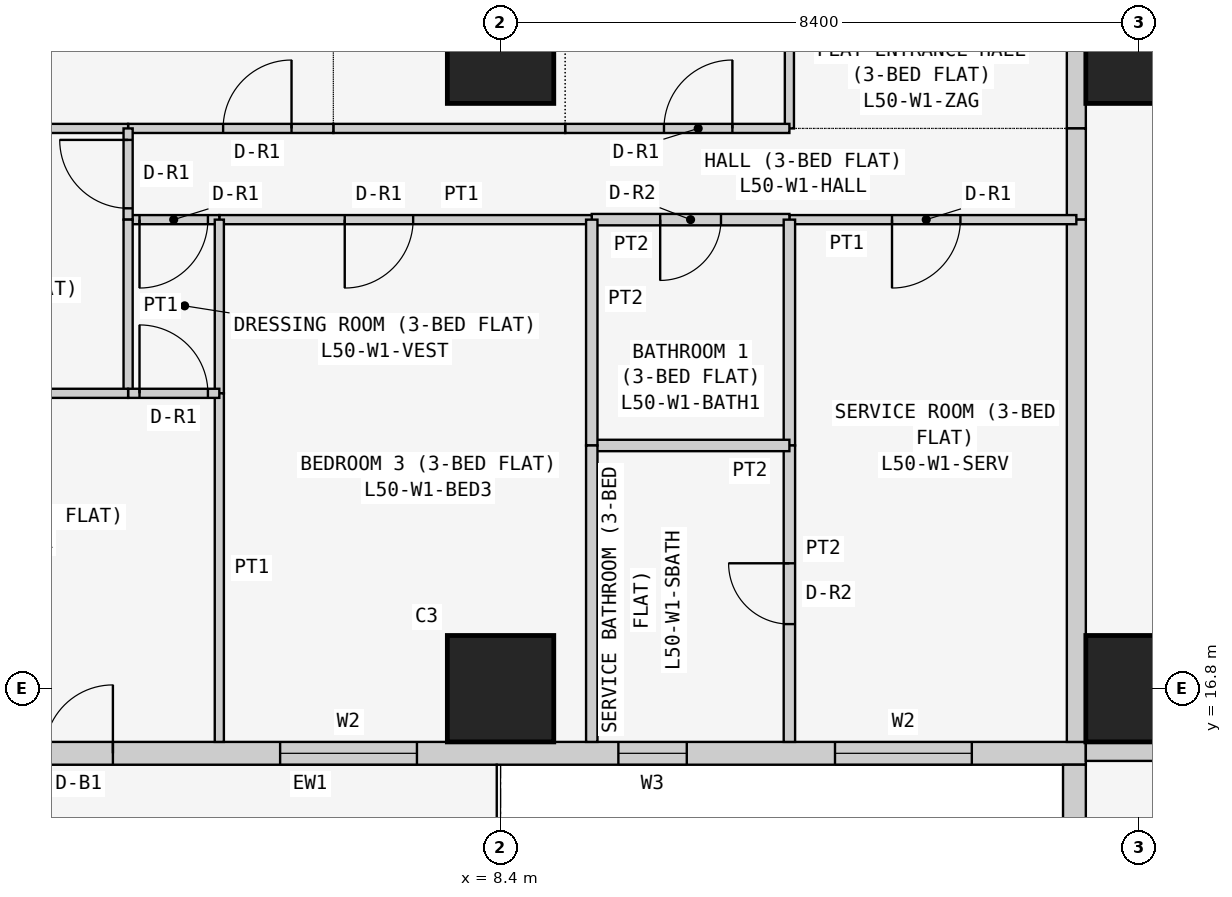
"""IFC4 building model, lengths in metres.
Left out: names, types, materials, properties, quantities, classifications, styles, units other than length and angle.
Written with IfcOpenShell. Run it as: python <this file> out.ifc"""

import sys

from ifc_helpers import new_model, si_unit, direction, frame, frame_2d, origin, origin_2d, place, context, subcontext, project, spatial, rectangle, extrude, element, fill, save


model = new_model("IFC4")
c1 = context("Model", 3, precision=1e-05, world=origin(), true_north=direction((0.0, 1.0)))
c2 = subcontext(c1, "Body", "Model", "MODEL_VIEW")
j1 = project(units=[si_unit("LENGTHUNIT", "METRE"), si_unit("PLANEANGLEUNIT", "RADIAN")], contexts=[c1])
p1 = place(None, origin())
s1 = spatial("IfcSite", under=j1, at=p1, CompositionType="ELEMENT")
p2 = place(p1, origin())
s2 = spatial("IfcBuilding", under=s1, at=p2, CompositionType="ELEMENT")
p3 = place(p2, frame((0.0, 0.0, 194.1)))
s3 = spatial("IfcBuildingStorey", under=s2, at=p3, CompositionType="ELEMENT", Elevation=194.1)
for number, where, z_axis, x_axis in (
    (1, (8.4, 16.8, 0.0), (0.0, 0.0, 1.0), (1.0, 0.0, 0.0)),
    (2, (8.4, 25.2, 0.0), (0.0, 0.0, 1.0), (1.0, 0.0, 0.0)),
    (3, (16.8, 16.8, 0.0), (0.0, 0.0, 1.0), (1.0, 0.0, 0.0)),
    (4, (16.8, 25.2, 0.0), (0.0, 0.0, 1.0), (1.0, 0.0, 0.0)),
):
    element("IfcColumn", number, at=place(p3, frame(where, z_axis=z_axis, x_axis=x_axis)), inside=s3, PredefinedType="COLUMN", context=c2, shape_type="SweptSolid", body=[
        extrude(rectangle(XDim=1.4, YDim=1.4, at=origin_2d()), origin(), (0.0, 0.0, 1.0), 3.6),
    ])
p4 = place(p3, frame((0.4, 15.95, 0.0), z_axis=(0.0, 0.0, 1.0), x_axis=(1.0, 0.0, 0.0)))
e5 = element("IfcWall", 5, at=p4, inside=s3, PredefinedType="SOLIDWALL", context=c2, shape_type="SweptSolid", body=[
    extrude(rectangle(XDim=15.7, YDim=0.3, at=frame_2d((7.85, 0.0))), origin(), (0.0, 0.0, 1.0), 3.45),
])
p5 = place(p4, frame((12.4, 0.0, 0.9)))
e6 = element("IfcOpeningElement", 6, at=p5, cuts=e5, PredefinedType="OPENING", context=c2, shape_type="SweptSolid", body=[
    extrude(rectangle(XDim=1.8, YDim=1.5, at=frame_2d((0.9, 0.75))), frame((0.0, 0.16, 0.0), z_axis=(0.0, -1.0, 0.0), x_axis=(1.0, 0.0, 0.0)), (0.0, 0.0, 1.0), 0.32),
])
p6 = place(p4, frame((9.55, 0.0, 1.5)))
e7 = element("IfcOpeningElement", 7, at=p6, cuts=e5, PredefinedType="OPENING", context=c2, shape_type="SweptSolid", body=[
    extrude(rectangle(XDim=0.9, YDim=0.7, at=frame_2d((0.45, 0.35))), frame((0.0, 0.16, 0.0), z_axis=(0.0, -1.0, 0.0), x_axis=(1.0, 0.0, 0.0)), (0.0, 0.0, 1.0), 0.32),
])
p7 = place(p4, frame((5.1, 0.0, 0.9)))
e8 = element("IfcOpeningElement", 8, at=p7, cuts=e5, PredefinedType="OPENING", context=c2, shape_type="SweptSolid", body=[
    extrude(rectangle(XDim=1.8, YDim=1.5, at=frame_2d((0.9, 0.75))), frame((0.0, 0.16, 0.0), z_axis=(0.0, -1.0, 0.0), x_axis=(1.0, 0.0, 0.0)), (0.0, 0.0, 1.0), 0.32),
])
p8 = place(p4, frame((2.0, 0.0, 0.0)))
e9 = element("IfcOpeningElement", 9, at=p8, cuts=e5, PredefinedType="OPENING", context=c2, shape_type="SweptSolid", body=[
    extrude(rectangle(XDim=0.9, YDim=2.4, at=frame_2d((0.45, 1.2))), frame((0.0, 0.16, 0.0), z_axis=(0.0, -1.0, 0.0), x_axis=(1.0, 0.0, 0.0)), (0.0, 0.0, 1.0), 0.32),
])
p9 = place(p4, frame((0.7, 0.0, 0.9)))
e10 = element("IfcOpeningElement", 10, at=p9, cuts=e5, PredefinedType="OPENING", context=c2, shape_type="SweptSolid", body=[
    extrude(rectangle(XDim=1.2, YDim=1.5, at=frame_2d((0.6, 0.75))), frame((0.0, 0.16, 0.0), z_axis=(0.0, -1.0, 0.0), x_axis=(1.0, 0.0, 0.0)), (0.0, 0.0, 1.0), 0.32),
])
p10 = place(p3, frame((15.95, 15.8, 0.0), z_axis=(0.0, 0.0, 1.0), x_axis=(0.0, -1.0, 0.0)))
e11 = element("IfcWall", 11, at=p10, inside=s3, PredefinedType="SOLIDWALL", context=c2, shape_type="SweptSolid", body=[
    extrude(rectangle(XDim=7.0, YDim=0.3, at=frame_2d((3.5, 0.0))), origin(), (0.0, 0.0, 1.0), 3.45),
])
p11 = place(p10, frame((1.5, 0.0, 0.9)))
e12 = element("IfcOpeningElement", 12, at=p11, cuts=e11, PredefinedType="OPENING", context=c2, shape_type="SweptSolid", body=[
    extrude(rectangle(XDim=2.4, YDim=1.5, at=frame_2d((1.2, 0.75))), frame((0.0, 0.16, 0.0), z_axis=(0.0, -1.0, 0.0), x_axis=(1.0, 0.0, 0.0)), (0.0, 0.0, 1.0), 0.32),
])
p12 = place(p10, frame((5.05, 0.0, 0.9)))
e13 = element("IfcOpeningElement", 13, at=p12, cuts=e11, PredefinedType="OPENING", context=c2, shape_type="SweptSolid", body=[
    extrude(rectangle(XDim=1.2, YDim=1.5, at=frame_2d((0.6, 0.75))), frame((0.0, 0.16, 0.0), z_axis=(0.0, -1.0, 0.0), x_axis=(1.0, 0.0, 0.0)), (0.0, 0.0, 1.0), 0.32),
])
p13 = place(p3, frame((22.971, 15.975, 0.0), z_axis=(0.0, 0.0, 1.0), x_axis=(-1.0, 0.0, 0.0)))
e14 = element("IfcWall", 14, at=p13, inside=s3, PredefinedType="PARTITIONING", context=c2, shape_type="SweptSolid", body=[
    extrude(rectangle(XDim=6.871, YDim=0.25, at=frame_2d((3.436, 0.0))), origin(), (0.0, 0.0, 1.0), 3.45),
])
p14 = place(p3, frame((15.975, 24.171, 0.0), z_axis=(0.0, 0.0, 1.0), x_axis=(0.0, 1.0, 0.0)))
e15 = element("IfcWall", 15, at=p14, inside=s3, PredefinedType="PARTITIONING", context=c2, shape_type="SweptSolid", body=[
    extrude(rectangle(XDim=5.229, YDim=0.25, at=frame_2d((2.615, 0.0))), origin(), (0.0, 0.0, 1.0), 3.45),
])
p15 = place(p14, frame((2.129, 0.0, 0.0)))
e16 = element("IfcOpeningElement", 16, at=p15, cuts=e15, PredefinedType="OPENING", context=c2, shape_type="SweptSolid", body=[
    extrude(rectangle(XDim=1.0, YDim=2.1, at=frame_2d((0.5, 1.05))), frame((0.0, 0.135, 0.0), z_axis=(0.0, -1.0, 0.0), x_axis=(1.0, 0.0, 0.0)), (0.0, 0.0, 1.0), 0.27),
])
p16 = place(p3, frame((15.975, 22.971, 0.0), z_axis=(0.0, 0.0, 1.0), x_axis=(0.0, 1.0, 0.0)))
e17 = element("IfcWall", 17, at=p16, inside=s3, PredefinedType="PARTITIONING", context=c2, shape_type="SweptSolid", body=[
    extrude(rectangle(XDim=1.2, YDim=0.25, at=frame_2d((0.6, 0.0))), origin(), (0.0, 0.0, 1.0), 3.45),
])
p17 = place(p3, frame((15.975, 16.1, 0.0), z_axis=(0.0, 0.0, 1.0), x_axis=(0.0, 1.0, 0.0)))
e18 = element("IfcWall", 18, at=p17, inside=s3, PredefinedType="PARTITIONING", context=c2, shape_type="SweptSolid", body=[
    extrude(rectangle(XDim=6.871, YDim=0.25, at=frame_2d((3.436, 0.0))), origin(), (0.0, 0.0, 1.0), 3.45),
])
p18 = place(p3, frame((12.2, 29.4, 0.0), z_axis=(0.0, 0.0, 1.0), x_axis=(0.0, -1.0, 0.0)))
e19 = element("IfcWall", 19, at=p18, inside=s3, PredefinedType="PARTITIONING", context=c2, shape_type="SweptSolid", body=[
    extrude(rectangle(XDim=5.229, YDim=0.12, at=frame_2d((2.615, 0.0))), origin(), (0.0, 0.0, 1.0), 3.45),
])
p19 = place(p3, frame((9.25, 24.171, 0.0), z_axis=(0.0, 0.0, 1.0), x_axis=(1.0, 0.0, 0.0)))
e20 = element("IfcWall", 20, at=p19, inside=s3, PredefinedType="PARTITIONING", context=c2, shape_type="SweptSolid", body=[
    extrude(rectangle(XDim=2.95, YDim=0.12, at=frame_2d((1.475, 0.0))), origin(), (0.0, 0.0, 1.0), 3.45),
])
p20 = place(p19, frame((1.3, 0.0, 0.0)))
e21 = element("IfcOpeningElement", 21, at=p20, cuts=e20, PredefinedType="OPENING", context=c2, shape_type="SweptSolid", body=[
    extrude(rectangle(XDim=0.9, YDim=2.1, at=frame_2d((0.45, 1.05))), frame((0.0, 0.07, 0.0), z_axis=(0.0, -1.0, 0.0), x_axis=(1.0, 0.0, 0.0)), (0.0, 0.0, 1.0), 0.14),
])
p21 = place(p3, frame((6.2, 24.171, 0.0), z_axis=(0.0, 0.0, 1.0), x_axis=(1.0, 0.0, 0.0)))
e22 = element("IfcWall", 22, at=p21, inside=s3, PredefinedType="PARTITIONING", context=c2, shape_type="SweptSolid", body=[
    extrude(rectangle(XDim=3.05, YDim=0.12, at=frame_2d((1.525, 0.0))), origin(), (0.0, 0.0, 1.0), 3.45),
])
p22 = place(p3, frame((3.5, 24.171, 0.0), z_axis=(0.0, 0.0, 1.0), x_axis=(1.0, 0.0, 0.0)))
e23 = element("IfcWall", 23, at=p22, inside=s3, PredefinedType="PARTITIONING", context=c2, shape_type="SweptSolid", body=[
    extrude(rectangle(XDim=2.7, YDim=0.12, at=frame_2d((1.35, 0.0))), origin(), (0.0, 0.0, 1.0), 3.45),
])
p23 = place(p22, frame((1.25, 0.0, 0.0)))
e24 = element("IfcOpeningElement", 24, at=p23, cuts=e23, PredefinedType="OPENING", context=c2, shape_type="SweptSolid", body=[
    extrude(rectangle(XDim=0.9, YDim=2.1, at=frame_2d((0.45, 1.05))), frame((0.0, 0.07, 0.0), z_axis=(0.0, -1.0, 0.0), x_axis=(1.0, 0.0, 0.0)), (0.0, 0.0, 1.0), 0.14),
])
p24 = place(p3, frame((-0.65, 24.171, 0.0), z_axis=(0.0, 0.0, 1.0), x_axis=(1.0, 0.0, 0.0)))
e25 = element("IfcWall", 25, at=p24, inside=s3, PredefinedType="PARTITIONING", context=c2, shape_type="SweptSolid", body=[
    extrude(rectangle(XDim=4.15, YDim=0.12, at=frame_2d((2.075, 0.0))), origin(), (0.0, 0.0, 1.0), 3.45),
])
p25 = place(p3, frame((12.2, 22.971, 0.0), z_axis=(0.0, 0.0, 1.0), x_axis=(1.0, 0.0, 0.0)))
e26 = element("IfcWall", 26, at=p25, inside=s3, PredefinedType="PARTITIONING", context=c2, shape_type="SweptSolid", body=[
    extrude(rectangle(XDim=3.775, YDim=0.12, at=frame_2d((1.888, 0.0))), origin(), (0.0, 0.0, 1.0), 3.45),
])
p26 = place(p25, frame((1.35, 0.0, 0.0)))
e27 = element("IfcOpeningElement", 27, at=p26, cuts=e26, PredefinedType="OPENING", context=c2, shape_type="SweptSolid", body=[
    extrude(rectangle(XDim=0.9, YDim=2.1, at=frame_2d((0.45, 1.05))), frame((0.0, 0.07, 0.0), z_axis=(0.0, -1.0, 0.0), x_axis=(1.0, 0.0, 0.0)), (0.0, 0.0, 1.0), 0.14),
])
p27 = place(p3, frame((9.6, 22.971, 0.0), z_axis=(0.0, 0.0, 1.0), x_axis=(1.0, 0.0, 0.0)))
e28 = element("IfcWall", 28, at=p27, inside=s3, PredefinedType="PARTITIONING", context=c2, shape_type="SweptSolid", body=[
    extrude(rectangle(XDim=2.6, YDim=0.15, at=frame_2d((1.3, 0.0))), origin(), (0.0, 0.0, 1.0), 3.45),
])
p28 = place(p27, frame((0.9, 0.0, 0.0)))
e29 = element("IfcOpeningElement", 29, at=p28, cuts=e28, PredefinedType="OPENING", context=c2, shape_type="SweptSolid", body=[
    extrude(rectangle(XDim=0.8, YDim=2.1, at=frame_2d((0.4, 1.05))), frame((0.0, 0.085, 0.0), z_axis=(0.0, -1.0, 0.0), x_axis=(1.0, 0.0, 0.0)), (0.0, 0.0, 1.0), 0.17),
])
p29 = place(p3, frame((4.7, 22.971, 0.0), z_axis=(0.0, 0.0, 1.0), x_axis=(1.0, 0.0, 0.0)))
e30 = element("IfcWall", 30, at=p29, inside=s3, PredefinedType="PARTITIONING", context=c2, shape_type="SweptSolid", body=[
    extrude(rectangle(XDim=4.9, YDim=0.12, at=frame_2d((2.45, 0.0))), origin(), (0.0, 0.0, 1.0), 3.45),
])
p30 = place(p29, frame((1.65, 0.0, 0.0)))
e31 = element("IfcOpeningElement", 31, at=p30, cuts=e30, PredefinedType="OPENING", context=c2, shape_type="SweptSolid", body=[
    extrude(rectangle(XDim=0.9, YDim=2.1, at=frame_2d((0.45, 1.05))), frame((0.0, 0.07, 0.0), z_axis=(0.0, -1.0, 0.0), x_axis=(1.0, 0.0, 0.0)), (0.0, 0.0, 1.0), 0.14),
])
p31 = place(p3, frame((3.5, 22.971, 0.0), z_axis=(0.0, 0.0, 1.0), x_axis=(1.0, 0.0, 0.0)))
e32 = element("IfcWall", 32, at=p31, inside=s3, PredefinedType="PARTITIONING", context=c2, shape_type="SweptSolid", body=[
    extrude(rectangle(XDim=1.2, YDim=0.12, at=frame_2d((0.6, 0.0))), origin(), (0.0, 0.0, 1.0), 3.45),
])
p32 = place(p31, frame((0.15, 0.0, 0.0)))
e33 = element("IfcOpeningElement", 33, at=p32, cuts=e32, PredefinedType="OPENING", context=c2, shape_type="SweptSolid", body=[
    extrude(rectangle(XDim=0.9, YDim=2.1, at=frame_2d((0.45, 1.05))), frame((0.0, 0.07, 0.0), z_axis=(0.0, -1.0, 0.0), x_axis=(1.0, 0.0, 0.0)), (0.0, 0.0, 1.0), 0.14),
])
p33 = place(p3, frame((3.5, 24.171, 0.0), z_axis=(0.0, 0.0, 1.0), x_axis=(0.0, -1.0, 0.0)))
e34 = element("IfcWall", 34, at=p33, inside=s3, PredefinedType="PARTITIONING", context=c2, shape_type="SweptSolid", body=[
    extrude(rectangle(XDim=1.2, YDim=0.12, at=frame_2d((0.6, 0.0))), origin(), (0.0, 0.0, 1.0), 3.45),
])
p34 = place(p33, frame((0.151, 0.0, 0.0)))
e35 = element("IfcOpeningElement", 35, at=p34, cuts=e34, PredefinedType="OPENING", context=c2, shape_type="SweptSolid", body=[
    extrude(rectangle(XDim=0.9, YDim=2.1, at=frame_2d((0.45, 1.05))), frame((0.0, 0.07, 0.0), z_axis=(0.0, -1.0, 0.0), x_axis=(1.0, 0.0, 0.0)), (0.0, 0.0, 1.0), 0.14),
])
p35 = place(p3, frame((12.2, 22.971, 0.0), z_axis=(0.0, 0.0, 1.0), x_axis=(0.0, -1.0, 0.0)))
e36 = element("IfcWall", 36, at=p35, inside=s3, PredefinedType="PARTITIONING", context=c2, shape_type="SweptSolid", body=[
    extrude(rectangle(XDim=2.971, YDim=0.15, at=frame_2d((1.485, 0.0))), origin(), (0.0, 0.0, 1.0), 3.45),
])
p36 = place(p3, frame((12.2, 20.0, 0.0), z_axis=(0.0, 0.0, 1.0), x_axis=(0.0, -1.0, 0.0)))
e37 = element("IfcWall", 37, at=p36, inside=s3, PredefinedType="PARTITIONING", context=c2, shape_type="SweptSolid", body=[
    extrude(rectangle(XDim=3.9, YDim=0.15, at=frame_2d((1.95, 0.0))), origin(), (0.0, 0.0, 1.0), 3.45),
])
p37 = place(p36, frame((1.55, 0.0, 0.0)))
e38 = element("IfcOpeningElement", 38, at=p37, cuts=e37, PredefinedType="OPENING", context=c2, shape_type="SweptSolid", body=[
    extrude(rectangle(XDim=0.8, YDim=2.1, at=frame_2d((0.4, 1.05))), frame((0.0, 0.085, 0.0), z_axis=(0.0, -1.0, 0.0), x_axis=(1.0, 0.0, 0.0)), (0.0, 0.0, 1.0), 0.17),
])
p38 = place(p3, frame((9.6, 20.0, 0.0), z_axis=(0.0, 0.0, 1.0), x_axis=(1.0, 0.0, 0.0)))
e39 = element("IfcWall", 39, at=p38, inside=s3, PredefinedType="PARTITIONING", context=c2, shape_type="SweptSolid", body=[
    extrude(rectangle(XDim=2.6, YDim=0.15, at=frame_2d((1.3, 0.0))), origin(), (0.0, 0.0, 1.0), 3.45),
])
p39 = place(p3, frame((9.6, 22.971, 0.0), z_axis=(0.0, 0.0, 1.0), x_axis=(0.0, -1.0, 0.0)))
e40 = element("IfcWall", 40, at=p39, inside=s3, PredefinedType="PARTITIONING", context=c2, shape_type="SweptSolid", body=[
    extrude(rectangle(XDim=2.971, YDim=0.15, at=frame_2d((1.485, 0.0))), origin(), (0.0, 0.0, 1.0), 3.45),
])
p40 = place(p3, frame((9.6, 20.0, 0.0), z_axis=(0.0, 0.0, 1.0), x_axis=(0.0, -1.0, 0.0)))
e41 = element("IfcWall", 41, at=p40, inside=s3, PredefinedType="PARTITIONING", context=c2, shape_type="SweptSolid", body=[
    extrude(rectangle(XDim=3.9, YDim=0.15, at=frame_2d((1.95, 0.0))), origin(), (0.0, 0.0, 1.0), 3.45),
])
p41 = place(p3, frame((4.7, 22.971, 0.0), z_axis=(0.0, 0.0, 1.0), x_axis=(0.0, -1.0, 0.0)))
e42 = element("IfcWall", 42, at=p41, inside=s3, PredefinedType="PARTITIONING", context=c2, shape_type="SweptSolid", body=[
    extrude(rectangle(XDim=2.285, YDim=0.12, at=frame_2d((1.143, 0.0))), origin(), (0.0, 0.0, 1.0), 3.45),
])
p42 = place(p3, frame((4.7, 20.686, 0.0), z_axis=(0.0, 0.0, 1.0), x_axis=(0.0, -1.0, 0.0)))
e43 = element("IfcWall", 43, at=p42, inside=s3, PredefinedType="PARTITIONING", context=c2, shape_type="SweptSolid", body=[
    extrude(rectangle(XDim=4.586, YDim=0.12, at=frame_2d((2.293, 0.0))), origin(), (0.0, 0.0, 1.0), 3.45),
])
p43 = place(p3, frame((3.5, 22.971, 0.0), z_axis=(0.0, 0.0, 1.0), x_axis=(0.0, -1.0, 0.0)))
e44 = element("IfcWall", 44, at=p43, inside=s3, PredefinedType="PARTITIONING", context=c2, shape_type="SweptSolid", body=[
    extrude(rectangle(XDim=2.285, YDim=0.12, at=frame_2d((1.143, 0.0))), origin(), (0.0, 0.0, 1.0), 3.45),
])
p44 = place(p3, frame((3.5, 20.686, 0.0), z_axis=(0.0, 0.0, 1.0), x_axis=(1.0, 0.0, 0.0)))
e45 = element("IfcWall", 45, at=p44, inside=s3, PredefinedType="PARTITIONING", context=c2, shape_type="SweptSolid", body=[
    extrude(rectangle(XDim=1.2, YDim=0.12, at=frame_2d((0.6, 0.0))), origin(), (0.0, 0.0, 1.0), 3.45),
])
p45 = place(p44, frame((0.15, 0.0, 0.0)))
e46 = element("IfcOpeningElement", 46, at=p45, cuts=e45, PredefinedType="OPENING", context=c2, shape_type="SweptSolid", body=[
    extrude(rectangle(XDim=0.9, YDim=2.1, at=frame_2d((0.45, 1.05))), frame((0.0, 0.07, 0.0), z_axis=(0.0, -1.0, 0.0), x_axis=(1.0, 0.0, 0.0)), (0.0, 0.0, 1.0), 0.14),
])
p46 = place(p3, frame((-0.65, 20.686, 0.0), z_axis=(0.0, 0.0, 1.0), x_axis=(1.0, 0.0, 0.0)))
e47 = element("IfcWall", 47, at=p46, inside=s3, PredefinedType="PARTITIONING", context=c2, shape_type="SweptSolid", body=[
    extrude(rectangle(XDim=4.15, YDim=0.12, at=frame_2d((2.075, 0.0))), origin(), (0.0, 0.0, 1.0), 3.45),
])
p47 = place(p5, origin())
e48 = element("IfcWindow", 48, at=p47, inside=s3, PartitioningType="SINGLE_PANEL", PredefinedType="WINDOW", context=c2, shape_type="SweptSolid", body=[
    extrude(rectangle(XDim=1.8, YDim=1.5, at=frame_2d((0.9, 0.75))), frame((0.0, 0.03, 0.0), z_axis=(0.0, -1.0, 0.0), x_axis=(1.0, 0.0, 0.0)), (0.0, 0.0, 1.0), 0.06),
])
fill(e6, e48)
p48 = place(p6, origin())
e49 = element("IfcWindow", 49, at=p48, inside=s3, PartitioningType="SINGLE_PANEL", PredefinedType="WINDOW", context=c2, shape_type="SweptSolid", body=[
    extrude(rectangle(XDim=0.9, YDim=0.7, at=frame_2d((0.45, 0.35))), frame((0.0, 0.03, 0.0), z_axis=(0.0, -1.0, 0.0), x_axis=(1.0, 0.0, 0.0)), (0.0, 0.0, 1.0), 0.06),
])
fill(e7, e49)
p49 = place(p7, origin())
e50 = element("IfcWindow", 50, at=p49, inside=s3, PartitioningType="SINGLE_PANEL", PredefinedType="WINDOW", context=c2, shape_type="SweptSolid", body=[
    extrude(rectangle(XDim=1.8, YDim=1.5, at=frame_2d((0.9, 0.75))), frame((0.0, 0.03, 0.0), z_axis=(0.0, -1.0, 0.0), x_axis=(1.0, 0.0, 0.0)), (0.0, 0.0, 1.0), 0.06),
])
fill(e8, e50)
p50 = place(p8, origin())
e51 = element("IfcDoor", 51, at=p50, inside=s3, OperationType="SINGLE_SWING_RIGHT", PredefinedType="DOOR", context=c2, shape_type="SweptSolid", body=[
    extrude(rectangle(XDim=0.9, YDim=2.4, at=frame_2d((0.45, 1.2))), frame((0.0, 0.025, 0.0), z_axis=(0.0, -1.0, 0.0), x_axis=(1.0, 0.0, 0.0)), (0.0, 0.0, 1.0), 0.05),
])
fill(e9, e51)
p51 = place(p20, origin())
e52 = element("IfcDoor", 52, at=p51, inside=s3, OperationType="SINGLE_SWING_RIGHT", PredefinedType="DOOR", context=c2, shape_type="SweptSolid", body=[
    extrude(rectangle(XDim=0.9, YDim=2.1, at=frame_2d((0.45, 1.05))), frame((0.0, 0.025, 0.0), z_axis=(0.0, -1.0, 0.0), x_axis=(1.0, 0.0, 0.0)), (0.0, 0.0, 1.0), 0.05),
])
fill(e21, e52)
p52 = place(p23, origin())
e53 = element("IfcDoor", 53, at=p52, inside=s3, OperationType="SINGLE_SWING_RIGHT", PredefinedType="DOOR", context=c2, shape_type="SweptSolid", body=[
    extrude(rectangle(XDim=0.9, YDim=2.1, at=frame_2d((0.45, 1.05))), frame((0.0, 0.025, 0.0), z_axis=(0.0, -1.0, 0.0), x_axis=(1.0, 0.0, 0.0)), (0.0, 0.0, 1.0), 0.05),
])
fill(e24, e53)
p53 = place(p26, frame((0.9, 0.0, 0.0), z_axis=(0.0, 0.0, 1.0), x_axis=(-1.0, 0.0, 0.0)))
e54 = element("IfcDoor", 54, at=p53, inside=s3, OperationType="SINGLE_SWING_RIGHT", PredefinedType="DOOR", context=c2, shape_type="SweptSolid", body=[
    extrude(rectangle(XDim=0.9, YDim=2.1, at=frame_2d((0.45, 1.05))), frame((0.0, 0.025, 0.0), z_axis=(0.0, -1.0, 0.0), x_axis=(1.0, 0.0, 0.0)), (0.0, 0.0, 1.0), 0.05),
])
fill(e27, e54)
p54 = place(p37, frame((0.8, 0.0, 0.0), z_axis=(0.0, 0.0, 1.0), x_axis=(-1.0, 0.0, 0.0)))
e55 = element("IfcDoor", 55, at=p54, inside=s3, OperationType="SINGLE_SWING_RIGHT", PredefinedType="DOOR", context=c2, shape_type="SweptSolid", body=[
    extrude(rectangle(XDim=0.8, YDim=2.1, at=frame_2d((0.4, 1.05))), frame((0.0, 0.025, 0.0), z_axis=(0.0, -1.0, 0.0), x_axis=(1.0, 0.0, 0.0)), (0.0, 0.0, 1.0), 0.05),
])
fill(e38, e55)
p55 = place(p28, frame((0.8, 0.0, 0.0), z_axis=(0.0, 0.0, 1.0), x_axis=(-1.0, 0.0, 0.0)))
e56 = element("IfcDoor", 56, at=p55, inside=s3, OperationType="SINGLE_SWING_RIGHT", PredefinedType="DOOR", context=c2, shape_type="SweptSolid", body=[
    extrude(rectangle(XDim=0.8, YDim=2.1, at=frame_2d((0.4, 1.05))), frame((0.0, 0.025, 0.0), z_axis=(0.0, -1.0, 0.0), x_axis=(1.0, 0.0, 0.0)), (0.0, 0.0, 1.0), 0.05),
])
fill(e29, e56)
p56 = place(p30, frame((0.9, 0.0, 0.0), z_axis=(0.0, 0.0, 1.0), x_axis=(-1.0, 0.0, 0.0)))
e57 = element("IfcDoor", 57, at=p56, inside=s3, OperationType="SINGLE_SWING_RIGHT", PredefinedType="DOOR", context=c2, shape_type="SweptSolid", body=[
    extrude(rectangle(XDim=0.9, YDim=2.1, at=frame_2d((0.45, 1.05))), frame((0.0, 0.025, 0.0), z_axis=(0.0, -1.0, 0.0), x_axis=(1.0, 0.0, 0.0)), (0.0, 0.0, 1.0), 0.05),
])
fill(e31, e57)
p57 = place(p32, frame((0.9, 0.0, 0.0), z_axis=(0.0, 0.0, 1.0), x_axis=(-1.0, 0.0, 0.0)))
e58 = element("IfcDoor", 58, at=p57, inside=s3, OperationType="SINGLE_SWING_RIGHT", PredefinedType="DOOR", context=c2, shape_type="SweptSolid", body=[
    extrude(rectangle(XDim=0.9, YDim=2.1, at=frame_2d((0.45, 1.05))), frame((0.0, 0.025, 0.0), z_axis=(0.0, -1.0, 0.0), x_axis=(1.0, 0.0, 0.0)), (0.0, 0.0, 1.0), 0.05),
])
fill(e33, e58)
p58 = place(p45, origin())
e59 = element("IfcDoor", 59, at=p58, inside=s3, OperationType="SINGLE_SWING_LEFT", PredefinedType="DOOR", context=c2, shape_type="SweptSolid", body=[
    extrude(rectangle(XDim=0.9, YDim=2.1, at=frame_2d((0.45, 1.05))), frame((0.0, 0.025, 0.0), z_axis=(0.0, -1.0, 0.0), x_axis=(1.0, 0.0, 0.0)), (0.0, 0.0, 1.0), 0.05),
])
fill(e46, e59)
p59 = place(p34, frame((0.9, 0.0, 0.0), z_axis=(0.0, 0.0, 1.0), x_axis=(-1.0, 0.0, 0.0)))
e60 = element("IfcDoor", 60, at=p59, inside=s3, OperationType="SINGLE_SWING_RIGHT", PredefinedType="DOOR", context=c2, shape_type="SweptSolid", body=[
    extrude(rectangle(XDim=0.9, YDim=2.1, at=frame_2d((0.45, 1.05))), frame((0.0, 0.025, 0.0), z_axis=(0.0, -1.0, 0.0), x_axis=(1.0, 0.0, 0.0)), (0.0, 0.0, 1.0), 0.05),
])
fill(e35, e60)
save(model, sys.argv[1])
